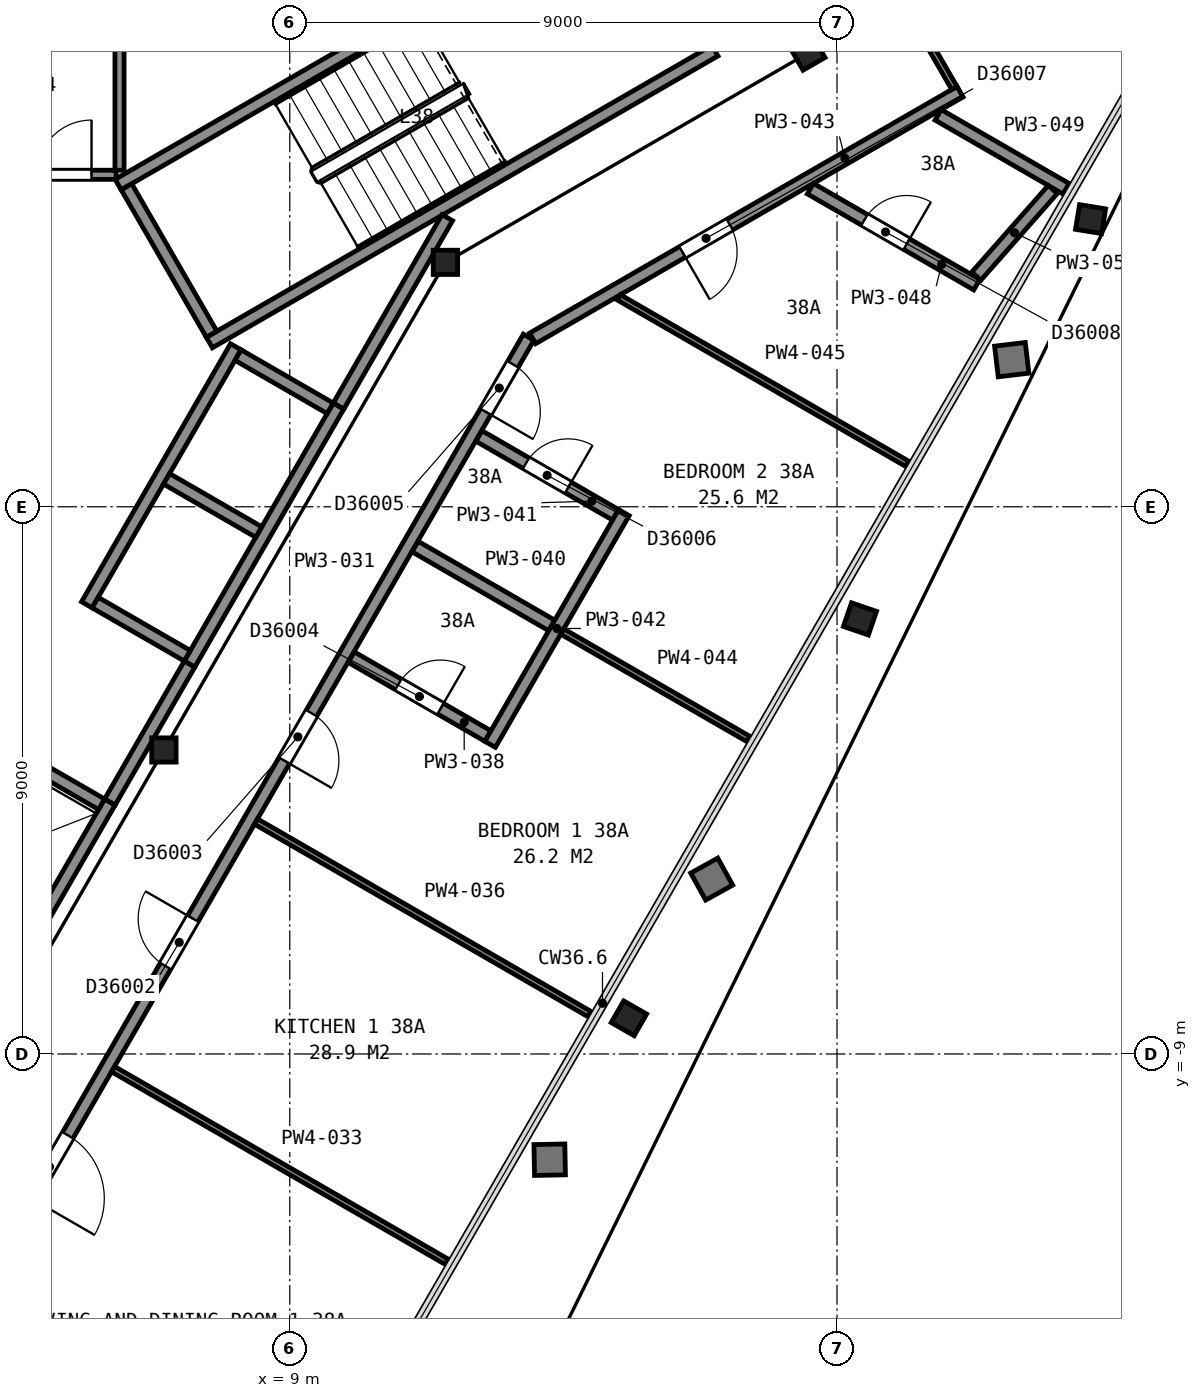
"""IFC4 building model, lengths in metres.
Left out: names, types, materials, properties, quantities, classifications, styles, units other than length and angle.
Written with IfcOpenShell. Run it as: python <this file> out.ifc"""

import sys

from ifc_helpers import new_model, si_unit, direction, frame, frame_2d, origin, origin_2d, place, context, subcontext, project, spatial, rectangle, i_section, extrude, element, fill, save


model = new_model("IFC4")
c1 = context("Model", 3, precision=1e-05, world=origin(), true_north=direction((0.0, 1.0)))
c2 = subcontext(c1, "Body", "Model", "MODEL_VIEW")
j1 = project(units=[si_unit("LENGTHUNIT", "METRE"), si_unit("PLANEANGLEUNIT", "RADIAN")], contexts=[c1])
p1 = place(None, origin())
s1 = spatial("IfcSite", under=j1, at=p1, CompositionType="ELEMENT")
p2 = place(p1, origin())
s2 = spatial("IfcBuilding", under=s1, at=p2, CompositionType="ELEMENT")
p3 = place(p2, frame((0.0, 0.0, 156.2)))
s3 = spatial("IfcBuildingStorey", under=s2, at=p3, CompositionType="ELEMENT", Elevation=156.2)
p4 = place(p3, frame((14.386, -8.303, 0.035), z_axis=(0.161950913523, -0.092968149868, 0.982409703087), x_axis=(-0.500182531239, -0.865919842872, 0.000511041508)))
e1 = element("IfcColumn", 1, at=p4, inside=s3, PredefinedType="COLUMN", context=c2, shape_type="SweptSolid", body=[
    extrude(i_section(OverallWidth=0.411, OverallDepth=0.434, WebThickness=0.036, FlangeThickness=0.057, FilletRadius=0.015, at=origin_2d()), origin(), (0.0, 0.0, 1.0), 3.695),
])
p5 = place(p3, frame((18.166, -1.772, 0.035), z_axis=(0.177894974061, -0.061037859648, 0.982154650701), x_axis=(-0.499529516713, -0.86551959835, 0.036689055665)))
e2 = element("IfcColumn", 2, at=p5, inside=s3, PredefinedType="COLUMN", context=c2, shape_type="SweptSolid", body=[
    extrude(i_section(OverallWidth=0.411, OverallDepth=0.434, WebThickness=0.036, FlangeThickness=0.057, FilletRadius=0.015, at=origin_2d()), origin(), (0.0, 0.0, 1.0), 3.696),
])
p6 = place(p3, frame((21.938, 4.769, 0.04), z_axis=(0.196042418618, -0.031792448872, 0.980079899956), x_axis=(-0.498718040148, -0.863790562914, 0.071736879304)))
e3 = element("IfcColumn", 3, at=p6, inside=s3, PredefinedType="COLUMN", context=c2, shape_type="SweptSolid", body=[
    extrude(i_section(OverallWidth=0.411, OverallDepth=0.434, WebThickness=0.036, FlangeThickness=0.057, FilletRadius=0.015, at=origin_2d()), origin(), (0.0, 0.0, 1.0), 3.694),
])
p7 = place(p3, frame((11.56, 4.02, 0.0), z_axis=(0.0, 0.0, 1.0), x_axis=(1.0, 0.0, 0.0)))
e4 = element("IfcColumn", 4, at=p7, inside=s3, PredefinedType="COLUMN", context=c2, shape_type="SweptSolid", body=[
    extrude(i_section(OverallWidth=0.401, OverallDepth=0.399, WebThickness=0.025, FlangeThickness=0.04, FilletRadius=0.015, at=origin_2d()), origin(), (0.0, 0.0, 1.0), 3.7),
])
p8 = place(p3, frame((17.52, 7.46, 0.0), z_axis=(0.0, 0.0, 1.0), x_axis=(0.5, -0.866025403784, 0.0)))
e5 = element("IfcColumn", 5, at=p8, inside=s3, PredefinedType="COLUMN", context=c2, shape_type="SweptSolid", body=[
    extrude(i_section(OverallWidth=0.406, OverallDepth=0.417, WebThickness=0.03, FlangeThickness=0.048, FilletRadius=0.015, at=origin_2d()), origin(), (0.0, 0.0, 1.0), 3.7),
])
p9 = place(p3, frame((6.93, -4.0, 0.0), z_axis=(0.0, 0.0, 1.0), x_axis=(1.0, 0.0, 0.0)))
e6 = element("IfcColumn", 6, at=p9, inside=s3, PredefinedType="COLUMN", context=c2, shape_type="SweptSolid", body=[
    extrude(i_section(OverallWidth=0.401, OverallDepth=0.399, WebThickness=0.025, FlangeThickness=0.04, FilletRadius=0.015, at=origin_2d()), origin(), (0.0, 0.0, 1.0), 3.7),
])
for number, where, z_axis, x_axis in (
    (7, (6.178, 5.299, 0.0), (0.0, 0.0, 1.0), (0.866, 0.5, 0.0)),
    (8, (7.678, 2.701, 0.0), (0.0, 0.0, 1.0), (0.866, 0.5, 0.0)),
):
    element("IfcWall", number, at=place(p3, frame(where, z_axis=z_axis, x_axis=x_axis)), inside=s3, PredefinedType="PARTITIONING", context=c2, shape_type="SweptSolid", body=[
        extrude(rectangle(XDim=9.6, YDim=0.2, at=frame_2d((4.8, 0.0))), origin(), (0.0, 0.0, 1.0), 3.45),
    ])
p10 = place(p3, frame((7.715, 2.838, 0.0), z_axis=(0.0, 0.0, 1.0), x_axis=(-0.500049511043, 0.865996816683, 0.0)))
e9 = element("IfcWall", 9, at=p10, inside=s3, PredefinedType="PARTITIONING", context=c2, shape_type="SweptSolid", body=[
    extrude(rectangle(XDim=2.8, YDim=0.2, at=frame_2d((1.4, 0.0))), origin(), (0.0, 0.0, 1.0), 3.45),
])
p11 = place(p3, frame((4.766, -7.065, 0.0), z_axis=(0.0, 0.0, 1.0), x_axis=(0.499948979701, 0.866054858364, 0.0)))
e10 = element("IfcWall", 10, at=p11, inside=s3, PredefinedType="PARTITIONING", context=c2, shape_type="SweptSolid", body=[
    extrude(rectangle(XDim=2.55, YDim=0.2, at=frame_2d((1.275, 0.0))), origin(), (0.0, 0.0, 1.0), 3.7),
])
p12 = place(p3, frame((7.351, -2.587, 0.0), z_axis=(0.0, 0.0, 1.0), x_axis=(0.500002801628, 0.866023786258, 0.0)))
e11 = element("IfcWall", 11, at=p12, inside=s3, PredefinedType="PARTITIONING", context=c2, shape_type="SweptSolid", body=[
    extrude(rectangle(XDim=4.9, YDim=0.2, at=frame_2d((2.45, 0.0))), origin(), (0.0, 0.0, 1.0), 3.7),
])
p13 = place(p3, frame((5.663, -1.612, 0.0), z_axis=(0.0, 0.0, 1.0), x_axis=(0.49998122708, 0.866036242063, 0.0)))
e12 = element("IfcWall", 12, at=p13, inside=s3, PredefinedType="PARTITIONING", context=c2, shape_type="SweptSolid", body=[
    extrude(rectangle(XDim=4.9, YDim=0.2, at=frame_2d((2.45, 0.0))), origin(), (0.0, 0.0, 1.0), 3.7),
])
p14 = place(p3, frame((9.665, 1.62, 0.0), z_axis=(0.0, 0.0, 1.0), x_axis=(-0.866002029911, 0.500040482552, 0.0)))
e13 = element("IfcWall", 13, at=p14, inside=s3, PredefinedType="PARTITIONING", context=c2, shape_type="SweptSolid", body=[
    extrude(rectangle(XDim=1.75, YDim=0.2, at=frame_2d((0.875, 0.0))), origin(), (0.0, 0.0, 1.0), 3.7),
])
for number, where, z_axis, x_axis in (
    (14, (8.49, -0.416, 0.0), (0.0, 0.0, 1.0), (-0.866, 0.5, 0.0)),
    (15, (7.315, -2.451, 0.0), (0.0, 0.0, 1.0), (-0.866, 0.5, 0.0)),
):
    element("IfcWall", number, at=place(p3, frame(where, z_axis=z_axis, x_axis=x_axis)), inside=s3, PredefinedType="PARTITIONING", context=c2, shape_type="SweptSolid", body=[
        extrude(rectangle(XDim=1.75, YDim=0.2, at=frame_2d((0.875, 0.0))), origin(), (0.0, 0.0, 1.0), 3.7),
    ])
p15 = place(p3, frame((5.905, -4.893, 0.0), z_axis=(0.0, 0.0, 1.0), x_axis=(-0.866002029911, 0.500040482552, 0.0)))
e16 = element("IfcWall", 16, at=p15, inside=s3, PredefinedType="PARTITIONING", context=c2, shape_type="SweptSolid", body=[
    extrude(rectangle(XDim=1.75, YDim=0.2, at=frame_2d((0.875, 0.0))), origin(), (0.0, 0.0, 1.0), 3.7),
])
p16 = place(p3, frame((0.925, 5.46, 0.0), z_axis=(0.0, 0.0, 1.0), x_axis=(1.0, 0.0, 0.0)))
e17 = element("IfcWall", 17, at=p16, inside=s3, PredefinedType="PARTITIONING", context=c2, shape_type="SweptSolid", body=[
    extrude(rectangle(XDim=5.22, YDim=0.15, at=frame_2d((2.61, 0.0))), origin(), (0.0, 0.0, 1.0), 3.45),
])
p17 = place(p16, frame((3.915, 0.0, 0.0)))
e18 = element("IfcOpeningElement", 18, at=p17, cuts=e17, PredefinedType="OPENING", context=c2, shape_type="SweptSolid", body=[
    extrude(rectangle(XDim=0.9, YDim=2.1, at=frame_2d((0.45, 1.05))), frame((0.0, 0.085, 0.0), z_axis=(0.0, -1.0, 0.0), x_axis=(1.0, 0.0, 0.0)), (0.0, 0.0, 1.0), 0.17),
])
p18 = place(p3, frame((6.042, -4.855, 0.0), z_axis=(0.0, 0.0, 1.0), x_axis=(0.500252727967, 0.865879442048, 0.0)))
e19 = element("IfcWall", 19, at=p18, inside=s3, PredefinedType="PARTITIONING", context=c2, shape_type="SweptSolid", body=[
    extrude(rectangle(XDim=2.617, YDim=0.2, at=frame_2d((1.309, 0.0))), origin(), (0.0, 0.0, 1.0), 3.45),
])
p19 = place(p3, frame((6.2, 5.535, 0.0), z_axis=(0.0, 0.0, 1.0), x_axis=(0.0, 1.0, 0.0)))
e20 = element("IfcWall", 20, at=p19, inside=s3, PredefinedType="PARTITIONING", context=c2, shape_type="SweptSolid", body=[
    extrude(rectangle(XDim=2.025, YDim=0.15, at=frame_2d((1.013, 0.0))), origin(), (0.0, 0.0, 1.0), 3.45),
])
p20 = place(p3, frame((9.803, 1.658, 0.0), z_axis=(0.0, 0.0, 1.0), x_axis=(0.499943114462, 0.866058244174, 0.0)))
e21 = element("IfcWall", 21, at=p20, inside=s3, PredefinedType="PARTITIONING", context=c2, shape_type="SweptSolid", body=[
    extrude(rectangle(XDim=3.576, YDim=0.2, at=frame_2d((1.788, 0.0))), origin(), (0.0, 0.0, 1.0), 3.45),
])
p21 = place(p3, frame((12.928, 2.789, 0.0), z_axis=(0.0, 0.0, 1.0), x_axis=(-0.499997769292, -0.86602669168, 0.0)))
e22 = element("IfcWall", 22, at=p21, inside=s3, PredefinedType="PARTITIONING", context=c2, shape_type="SweptSolid", body=[
    extrude(rectangle(XDim=17.706, YDim=0.2, at=frame_2d((8.853, 0.0))), origin(), (0.0, 0.0, 1.0), 2.713),
])
p22 = place(p21, frame((15.156, 0.0, 0.0)))
e23 = element("IfcOpeningElement", 23, at=p22, cuts=e22, PredefinedType="OPENING", context=c2, shape_type="SweptSolid", body=[
    extrude(rectangle(XDim=1.2, YDim=2.1, at=frame_2d((0.6, 1.05))), frame((0.0, 0.11, 0.0), z_axis=(0.0, -1.0, 0.0), x_axis=(1.0, 0.0, 0.0)), (0.0, 0.0, 1.0), 0.22),
])
p23 = place(p21, frame((11.042, 0.0, 0.0)))
e24 = element("IfcOpeningElement", 24, at=p23, cuts=e22, PredefinedType="OPENING", context=c2, shape_type="SweptSolid", body=[
    extrude(rectangle(XDim=0.9, YDim=2.1, at=frame_2d((0.45, 1.05))), frame((0.0, 0.11, 0.0), z_axis=(0.0, -1.0, 0.0), x_axis=(1.0, 0.0, 0.0)), (0.0, 0.0, 1.0), 0.22),
])
p24 = place(p21, frame((7.14, 0.0, 0.0)))
e25 = element("IfcOpeningElement", 25, at=p24, cuts=e22, PredefinedType="OPENING", context=c2, shape_type="SweptSolid", body=[
    extrude(rectangle(XDim=0.9, YDim=2.1, at=frame_2d((0.45, 1.05))), frame((0.0, 0.11, 0.0), z_axis=(0.0, -1.0, 0.0), x_axis=(1.0, 0.0, 0.0)), (0.0, 0.0, 1.0), 0.22),
])
p25 = place(p21, frame((0.515, 0.0, 0.0)))
e26 = element("IfcOpeningElement", 26, at=p25, cuts=e22, PredefinedType="OPENING", context=c2, shape_type="SweptSolid", body=[
    extrude(rectangle(XDim=0.9, YDim=2.1, at=frame_2d((0.45, 1.05))), frame((0.0, 0.11, 0.0), z_axis=(0.0, -1.0, 0.0), x_axis=(1.0, 0.0, 0.0)), (0.0, 0.0, 1.0), 0.22),
])
for number, where, z_axis, x_axis in (
    (27, (6.094, -9.249, 0.0), (0.0, 0.0, 1.0), (0.866, -0.5, 0.0)),
    (28, (8.445, -5.177, 0.0), (0.0, 0.0, 1.0), (0.866, -0.5, 0.0)),
):
    element("IfcWall", number, at=place(p3, frame(where, z_axis=z_axis, x_axis=x_axis)), inside=s3, PredefinedType="PARTITIONING", context=c2, shape_type="SweptSolid", body=[
        extrude(rectangle(XDim=6.333, YDim=0.1, at=frame_2d((3.167, 0.0))), origin(), (0.0, 0.0, 1.0), 2.713),
    ])
p26 = place(p3, frame((10.011, -2.473, 0.0), z_axis=(0.0, 0.0, 1.0), x_axis=(0.866005410122, -0.500034628441, 0.0)))
e29 = element("IfcWall", 29, at=p26, inside=s3, PredefinedType="PARTITIONING", context=c2, shape_type="SweptSolid", body=[
    extrude(rectangle(XDim=2.595, YDim=0.2, at=frame_2d((1.297, 0.0))), origin(), (0.0, 0.0, 1.0), 2.713),
])
p27 = place(p26, frame((0.895, 0.0, 0.0)))
e30 = element("IfcOpeningElement", 30, at=p27, cuts=e29, PredefinedType="OPENING", context=c2, shape_type="SweptSolid", body=[
    extrude(rectangle(XDim=0.8, YDim=2.1, at=frame_2d((0.4, 1.05))), frame((0.0, 0.11, 0.0), z_axis=(0.0, -1.0, 0.0), x_axis=(1.0, 0.0, 0.0)), (0.0, 0.0, 1.0), 0.22),
])
p28 = place(p3, frame((11.061, -0.655, 0.0), z_axis=(0.0, 0.0, 1.0), x_axis=(0.866046148833, -0.4999640668, 0.0)))
e31 = element("IfcWall", 31, at=p28, inside=s3, PredefinedType="PARTITIONING", context=c2, shape_type="SweptSolid", body=[
    extrude(rectangle(XDim=2.595, YDim=0.2, at=frame_2d((1.297, 0.0))), origin(), (0.0, 0.0, 1.0), 2.713),
])
p29 = place(p3, frame((14.358, -0.133, 0.0), z_axis=(0.0, 0.0, 1.0), x_axis=(-0.866028930478, 0.499993891537, 0.0)))
e32 = element("IfcWall", 32, at=p29, inside=s3, PredefinedType="PARTITIONING", context=c2, shape_type="SweptSolid", body=[
    extrude(rectangle(XDim=2.595, YDim=0.2, at=frame_2d((1.298, 0.0))), origin(), (0.0, 0.0, 1.0), 2.713),
])
p30 = place(p29, frame((0.9, 0.0, 0.0)))
e33 = element("IfcOpeningElement", 33, at=p30, cuts=e32, PredefinedType="OPENING", context=c2, shape_type="SweptSolid", body=[
    extrude(rectangle(XDim=0.8, YDim=2.1, at=frame_2d((0.4, 1.05))), frame((0.0, 0.11, 0.0), z_axis=(0.0, -1.0, 0.0), x_axis=(1.0, 0.0, 0.0)), (0.0, 0.0, 1.0), 0.22),
])
p31 = place(p3, frame((12.295, -3.908, 0.0), z_axis=(0.0, 0.0, 1.0), x_axis=(0.499916153699, 0.866073807057, 0.0)))
e34 = element("IfcWall", 34, at=p31, inside=s3, PredefinedType="PARTITIONING", context=c2, shape_type="SweptSolid", body=[
    extrude(rectangle(XDim=4.401, YDim=0.2, at=frame_2d((2.2, 0.0))), origin(), (0.0, 0.0, 1.0), 2.713),
])
p32 = place(p3, frame((20.023, 6.826, 0.0), z_axis=(0.0, 0.0, 1.0), x_axis=(-0.866100425926, -0.499870035319, 0.0)))
e35 = element("IfcWall", 35, at=p32, inside=s3, PredefinedType="PARTITIONING", context=c2, shape_type="SweptSolid", body=[
    extrude(rectangle(XDim=8.115, YDim=0.2, at=frame_2d((4.058, 0.0))), origin(), (0.0, 0.0, 1.0), 2.713),
])
p33 = place(p32, frame((4.373, 0.0, 0.0)))
e36 = element("IfcOpeningElement", 36, at=p33, cuts=e35, PredefinedType="OPENING", context=c2, shape_type="SweptSolid", body=[
    extrude(rectangle(XDim=0.9, YDim=2.1, at=frame_2d((0.45, 1.05))), frame((0.0, 0.11, 0.0), z_axis=(0.0, -1.0, 0.0), x_axis=(1.0, 0.0, 0.0)), (0.0, 0.0, 1.0), 0.22),
])
p34 = place(p3, frame((13.482, -2.052, 0.0), z_axis=(0.0, 0.0, 1.0), x_axis=(0.865998048674, -0.500047377448, 0.0)))
e37 = element("IfcWall", 37, at=p34, inside=s3, PredefinedType="PARTITIONING", context=c2, shape_type="SweptSolid", body=[
    extrude(rectangle(XDim=3.534, YDim=0.1, at=frame_2d((1.767, 0.0))), origin(), (0.0, 0.0, 1.0), 2.713),
])
p35 = place(p3, frame((14.412, 3.444, 0.0), z_axis=(0.0, 0.0, 1.0), x_axis=(0.866045268016, -0.499965592563, 0.0)))
e38 = element("IfcWall", 38, at=p35, inside=s3, PredefinedType="PARTITIONING", context=c2, shape_type="SweptSolid", body=[
    extrude(rectangle(XDim=5.476, YDim=0.1, at=frame_2d((2.738, 0.0))), origin(), (0.0, 0.0, 1.0), 2.713),
])
p36 = place(p3, frame((15.928, 13.812, 0.0), z_axis=(0.0, 0.0, 1.0), x_axis=(0.500420003794, -0.865782778648, 0.0)))
e39 = element("IfcWall", 39, at=p36, inside=s3, PredefinedType="PARTITIONING", context=c2, shape_type="SweptSolid", body=[
    extrude(rectangle(XDim=7.997, YDim=0.1, at=frame_2d((3.999, 0.0))), origin(), (0.0, 0.0, 1.0), 2.713),
])
p37 = place(p36, frame((3.4, 0.0, 0.0)))
e40 = element("IfcOpeningElement", 40, at=p37, cuts=e39, PredefinedType="OPENING", context=c2, shape_type="SweptSolid", body=[
    extrude(rectangle(XDim=1.2, YDim=2.1, at=frame_2d((0.6, 1.05))), frame((0.0, 0.06, 0.0), z_axis=(0.0, -1.0, 0.0), x_axis=(1.0, 0.0, 0.0)), (0.0, 0.0, 1.0), 0.12),
])
p38 = place(p3, frame((17.562, 5.232, 0.0), z_axis=(0.0, 0.0, 1.0), x_axis=(0.866109679077, -0.499854002494, 0.0)))
e41 = element("IfcWall", 41, at=p38, inside=s3, PredefinedType="PARTITIONING", context=c2, shape_type="SweptSolid", body=[
    extrude(rectangle(XDim=3.16, YDim=0.2, at=frame_2d((1.58, 0.0))), origin(), (0.0, 0.0, 1.0), 2.713),
])
p39 = place(p38, frame((1.027, 0.0, 0.0)))
e42 = element("IfcOpeningElement", 42, at=p39, cuts=e41, PredefinedType="OPENING", context=c2, shape_type="SweptSolid", body=[
    extrude(rectangle(XDim=0.8, YDim=2.1, at=frame_2d((0.4, 1.05))), frame((0.0, 0.11, 0.0), z_axis=(0.0, -1.0, 0.0), x_axis=(1.0, 0.0, 0.0)), (0.0, 0.0, 1.0), 0.22),
])
p40 = place(p3, frame((19.663, 6.445, 0.0), z_axis=(0.0, 0.0, 1.0), x_axis=(0.86589602499, -0.50022402372, 0.0)))
e43 = element("IfcWall", 43, at=p40, inside=s3, PredefinedType="PARTITIONING", context=c2, shape_type="SweptSolid", body=[
    extrude(rectangle(XDim=2.43, YDim=0.2, at=frame_2d((1.215, 0.0))), origin(), (0.0, 0.0, 1.0), 2.713),
])
p41 = place(p3, frame((20.291, 3.793, 0.0), z_axis=(0.0, 0.0, 1.0), x_axis=(0.661392149771, 0.750040281733, 0.0)))
e44 = element("IfcWall", 44, at=p41, inside=s3, PredefinedType="PARTITIONING", context=c2, shape_type="SweptSolid", body=[
    extrude(rectangle(XDim=1.9, YDim=0.2, at=frame_2d((0.95, 0.0))), origin(), (0.0, 0.0, 1.0), 2.713),
])
p42 = place(p17, origin())
e45 = element("IfcDoor", 45, at=p42, inside=s3, OperationType="SINGLE_SWING_RIGHT", PredefinedType="DOOR", context=c2, shape_type="SweptSolid", body=[
    extrude(rectangle(XDim=0.9, YDim=2.1, at=frame_2d((0.45, 1.05))), frame((0.0, 0.025, 0.0), z_axis=(0.0, -1.0, 0.0), x_axis=(1.0, 0.0, 0.0)), (0.0, 0.0, 1.0), 0.05),
])
fill(e18, e45)
p43 = place(p22, origin())
e46 = element("IfcDoor", 46, at=p43, inside=s3, OperationType="SINGLE_SWING_RIGHT", PredefinedType="DOOR", context=c2, shape_type="SweptSolid", body=[
    extrude(rectangle(XDim=1.2, YDim=2.1, at=frame_2d((0.6, 1.05))), frame((0.0, 0.025, 0.0), z_axis=(0.0, -1.0, 0.0), x_axis=(1.0, 0.0, 0.0)), (0.0, 0.0, 1.0), 0.05),
])
fill(e23, e46)
p44 = place(p23, origin())
e47 = element("IfcDoor", 47, at=p44, inside=s3, OperationType="SINGLE_SWING_LEFT", PredefinedType="DOOR", context=c2, shape_type="SweptSolid", body=[
    extrude(rectangle(XDim=0.9, YDim=2.1, at=frame_2d((0.45, 1.05))), frame((0.0, 0.025, 0.0), z_axis=(0.0, -1.0, 0.0), x_axis=(1.0, 0.0, 0.0)), (0.0, 0.0, 1.0), 0.05),
])
fill(e24, e47)
p45 = place(p24, origin())
e48 = element("IfcDoor", 48, at=p45, inside=s3, OperationType="SINGLE_SWING_RIGHT", PredefinedType="DOOR", context=c2, shape_type="SweptSolid", body=[
    extrude(rectangle(XDim=0.9, YDim=2.1, at=frame_2d((0.45, 1.05))), frame((0.0, 0.025, 0.0), z_axis=(0.0, -1.0, 0.0), x_axis=(1.0, 0.0, 0.0)), (0.0, 0.0, 1.0), 0.05),
])
fill(e25, e48)
p46 = place(p25, origin())
e49 = element("IfcDoor", 49, at=p46, inside=s3, OperationType="SINGLE_SWING_RIGHT", PredefinedType="DOOR", context=c2, shape_type="SweptSolid", body=[
    extrude(rectangle(XDim=0.9, YDim=2.1, at=frame_2d((0.45, 1.05))), frame((0.0, 0.025, 0.0), z_axis=(0.0, -1.0, 0.0), x_axis=(1.0, 0.0, 0.0)), (0.0, 0.0, 1.0), 0.05),
])
fill(e26, e49)
p47 = place(p27, origin())
e50 = element("IfcDoor", 50, at=p47, inside=s3, OperationType="SINGLE_SWING_RIGHT", PredefinedType="DOOR", context=c2, shape_type="SweptSolid", body=[
    extrude(rectangle(XDim=0.8, YDim=2.1, at=frame_2d((0.4, 1.05))), frame((0.0, 0.025, 0.0), z_axis=(0.0, -1.0, 0.0), x_axis=(1.0, 0.0, 0.0)), (0.0, 0.0, 1.0), 0.05),
])
fill(e30, e50)
p48 = place(p30, origin())
e51 = element("IfcDoor", 51, at=p48, inside=s3, OperationType="SINGLE_SWING_LEFT", PredefinedType="DOOR", context=c2, shape_type="SweptSolid", body=[
    extrude(rectangle(XDim=0.8, YDim=2.1, at=frame_2d((0.4, 1.05))), frame((0.0, 0.025, 0.0), z_axis=(0.0, -1.0, 0.0), x_axis=(1.0, 0.0, 0.0)), (0.0, 0.0, 1.0), 0.05),
])
fill(e33, e51)
p49 = place(p33, origin())
e52 = element("IfcDoor", 52, at=p49, inside=s3, OperationType="SINGLE_SWING_RIGHT", PredefinedType="DOOR", context=c2, shape_type="SweptSolid", body=[
    extrude(rectangle(XDim=0.9, YDim=2.1, at=frame_2d((0.45, 1.05))), frame((0.0, 0.025, 0.0), z_axis=(0.0, -1.0, 0.0), x_axis=(1.0, 0.0, 0.0)), (0.0, 0.0, 1.0), 0.05),
])
fill(e36, e52)
p50 = place(p39, origin())
e53 = element("IfcDoor", 53, at=p50, inside=s3, OperationType="SINGLE_SWING_RIGHT", PredefinedType="DOOR", context=c2, shape_type="SweptSolid", body=[
    extrude(rectangle(XDim=0.8, YDim=2.1, at=frame_2d((0.4, 1.05))), frame((0.0, 0.025, 0.0), z_axis=(0.0, -1.0, 0.0), x_axis=(1.0, 0.0, 0.0)), (0.0, 0.0, 1.0), 0.05),
])
fill(e42, e53)
save(model, sys.argv[1])
